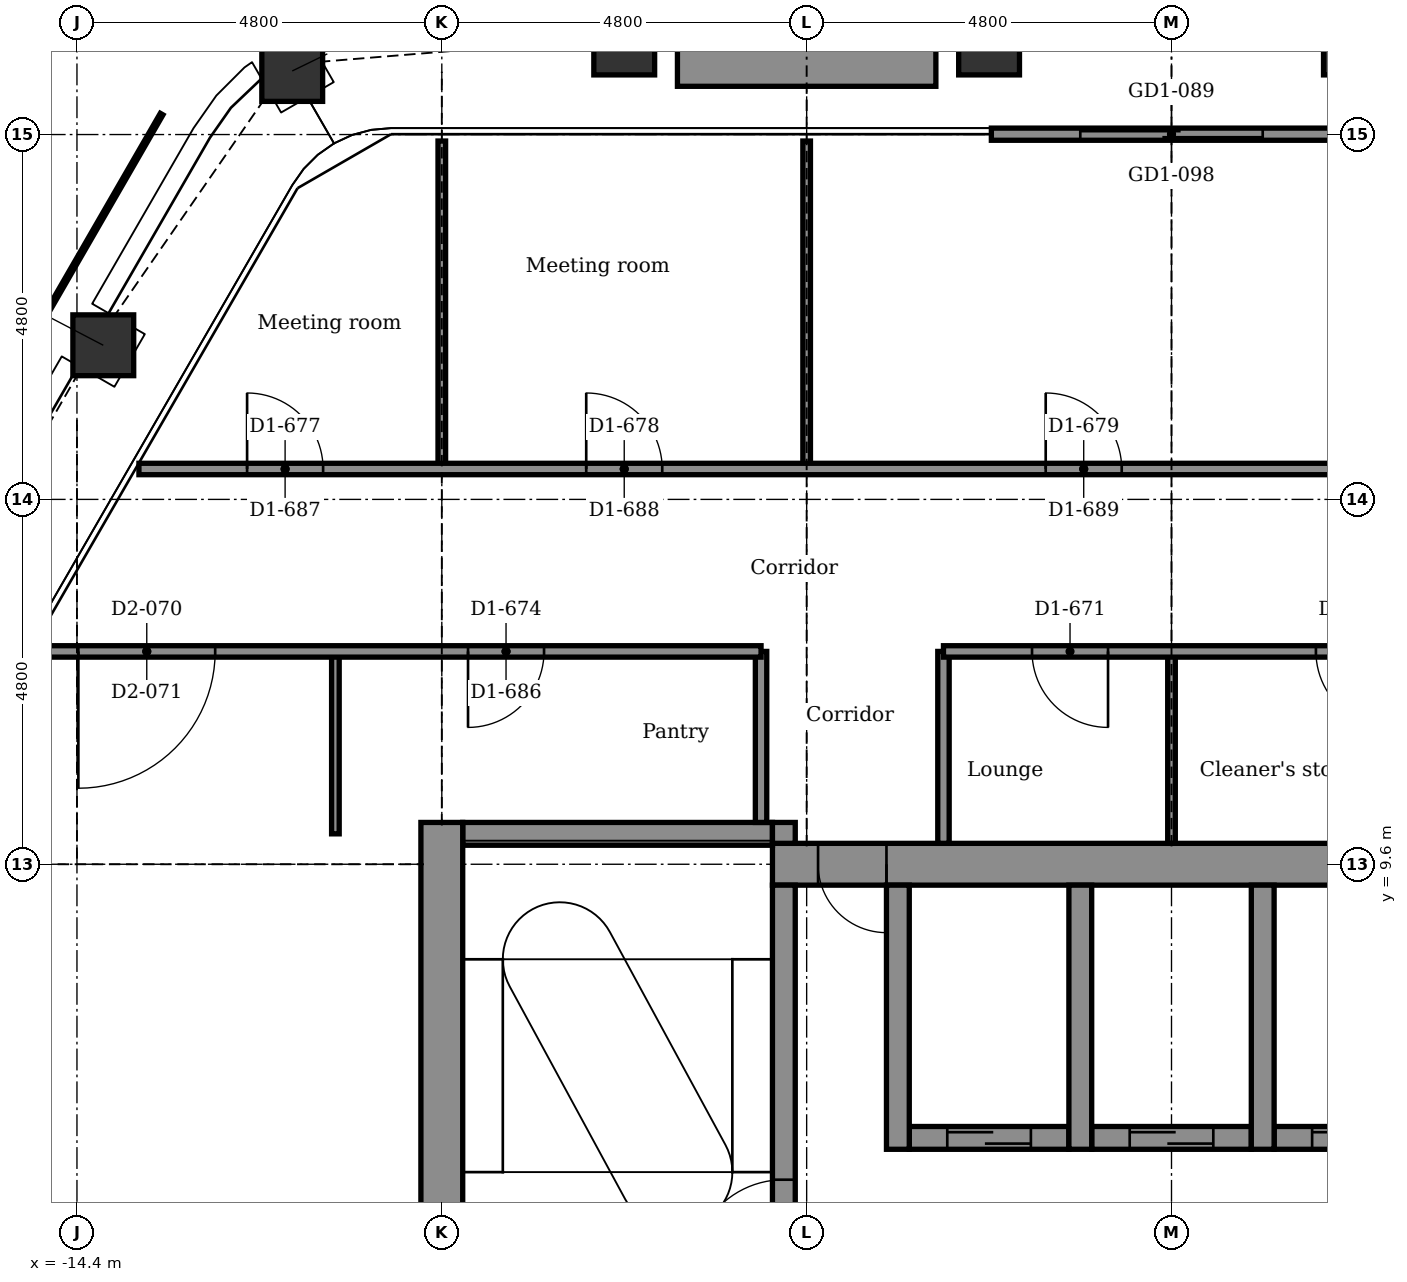
"""IFC4 building model, lengths in metres.
Left out: names, types, materials, properties, quantities, classifications, styles, units other than length and angle.
Written with IfcOpenShell. Run it as: python <this file> out.ifc"""

import sys

from ifc_helpers import new_model, si_unit, direction, frame, frame_2d, origin, origin_2d, place, context, subcontext, project, spatial, rectangle, extrude, element, fill, save


model = new_model("IFC4")
c1 = context("Model", 3, precision=1e-05, world=origin(), true_north=direction((0.0, 1.0)))
c2 = subcontext(c1, "Body", "Model", "MODEL_VIEW")
j1 = project(units=[si_unit("LENGTHUNIT", "METRE"), si_unit("PLANEANGLEUNIT", "RADIAN")], contexts=[c1])
p1 = place(None, origin())
s1 = spatial("IfcSite", under=j1, at=p1, CompositionType="ELEMENT")
p2 = place(p1, origin())
s2 = spatial("IfcBuilding", under=s1, at=p2, CompositionType="ELEMENT")
p3 = place(p2, frame((0.0, 0.0, 242.3)))
s3 = spatial("IfcBuildingStorey", under=s2, at=p3, CompositionType="ELEMENT", Elevation=242.3)
for number, where, z_axis, x_axis in (
    (1, (-11.568, 20.036, -0.15), (0.0, 0.0, 1.0), (0.866, 0.5, 0.0)),
    (2, (-7.2, 20.385, -0.15), (0.0, 0.0, 1.0), (1.0, 0.0, 0.0)),
    (3, (-2.4, 20.385, -0.15), (0.0, 0.0, 1.0), (1.0, 0.0, 0.0)),
    (4, (2.4, 20.385, -0.15), (0.0, 0.0, 1.0), (1.0, 0.0, 0.0)),
    (5, (-14.054, 16.428, -0.15), (0.0, 0.0, 1.0), (0.5, 0.866, 0.0)),
):
    element("IfcColumn", number, at=place(p3, frame(where, z_axis=z_axis, x_axis=x_axis)), inside=s3, PredefinedType="COLUMN", context=c2, shape_type="SweptSolid", body=[
        extrude(rectangle(XDim=0.8, YDim=0.8, at=origin_2d()), origin(), (0.0, 0.0, 1.0), 3.9),
    ])
p4 = place(p3, frame((-3.45, 6.0, -0.15), z_axis=(0.0, 0.0, 1.0), x_axis=(1.0, 0.0, 0.0)))
e6 = element("IfcWall", 6, at=p4, inside=s3, PredefinedType="STANDARD", context=c2, shape_type="SweptSolid", body=[
    extrude(rectangle(XDim=2.1, YDim=0.3, at=frame_2d((1.05, 0.0))), origin(), (0.0, 0.0, 1.0), 3.9),
])
p5 = place(p4, frame((0.5, 0.0, 0.15)))
e7 = element("IfcOpeningElement", 7, at=p5, cuts=e6, PredefinedType="OPENING", context=c2, shape_type="SweptSolid", body=[
    extrude(rectangle(XDim=1.1, YDim=2.1, at=frame_2d((0.55, 1.05))), frame((0.0, 0.16, 0.0), z_axis=(0.0, -1.0, 0.0), x_axis=(1.0, 0.0, 0.0)), (0.0, 0.0, 1.0), 0.32),
])
p6 = place(p3, frame((-1.05, 6.0, -0.15), z_axis=(0.0, 0.0, 1.0), x_axis=(1.0, 0.0, 0.0)))
e8 = element("IfcWall", 8, at=p6, inside=s3, PredefinedType="STANDARD", context=c2, shape_type="SweptSolid", body=[
    extrude(rectangle(XDim=2.1, YDim=0.3, at=frame_2d((1.05, 0.0))), origin(), (0.0, 0.0, 1.0), 3.9),
])
p7 = place(p6, frame((0.5, 0.0, 0.15)))
e9 = element("IfcOpeningElement", 9, at=p7, cuts=e8, PredefinedType="OPENING", context=c2, shape_type="SweptSolid", body=[
    extrude(rectangle(XDim=1.1, YDim=2.1, at=frame_2d((0.55, 1.05))), frame((0.0, 0.16, 0.0), z_axis=(0.0, -1.0, 0.0), x_axis=(1.0, 0.0, 0.0)), (0.0, 0.0, 1.0), 0.32),
])
p8 = place(p3, frame((1.35, 6.0, -0.15), z_axis=(0.0, 0.0, 1.0), x_axis=(1.0, 0.0, 0.0)))
e10 = element("IfcWall", 10, at=p8, inside=s3, PredefinedType="STANDARD", context=c2, shape_type="SweptSolid", body=[
    extrude(rectangle(XDim=2.1, YDim=0.3, at=frame_2d((1.05, 0.0))), origin(), (0.0, 0.0, 1.0), 3.9),
])
p9 = place(p8, frame((0.5, 0.0, 0.15)))
e11 = element("IfcOpeningElement", 11, at=p9, cuts=e10, PredefinedType="OPENING", context=c2, shape_type="SweptSolid", body=[
    extrude(rectangle(XDim=1.1, YDim=2.1, at=frame_2d((0.55, 1.05))), frame((0.0, 0.16, 0.0), z_axis=(0.0, -1.0, 0.0), x_axis=(1.0, 0.0, 0.0)), (0.0, 0.0, 1.0), 0.32),
])
p10 = place(p3, frame((-5.25, 9.6, -0.15), z_axis=(0.0, 0.0, 1.0), x_axis=(1.0, 0.0, 0.0)))
e12 = element("IfcWall", 12, at=p10, inside=s3, PredefinedType="SHEAR", context=c2, shape_type="SweptSolid", body=[
    extrude(rectangle(XDim=14.575, YDim=0.55, at=frame_2d((7.288, 0.0))), origin(), (0.0, 0.0, 1.0), 3.9),
])
p11 = place(p10, frame((0.6, 0.0, 0.15)))
e13 = element("IfcOpeningElement", 13, at=p11, cuts=e12, PredefinedType="OPENING", context=c2, shape_type="SweptSolid", body=[
    extrude(rectangle(XDim=0.9, YDim=2.1, at=frame_2d((0.45, 1.05))), frame((0.0, 0.285, 0.0), z_axis=(0.0, -1.0, 0.0), x_axis=(1.0, 0.0, 0.0)), (0.0, 0.0, 1.0), 0.57),
])
p12 = place(p3, frame((-9.325, 10.0, -0.15), z_axis=(0.0, 0.0, 1.0), x_axis=(1.0, 0.0, 0.0)))
e14 = element("IfcWall", 14, at=p12, inside=s3, PredefinedType="STANDARD", context=c2, shape_type="SweptSolid", body=[
    extrude(rectangle(XDim=4.075, YDim=0.3, at=frame_2d((2.038, 0.0))), origin(), (0.0, 0.0, 1.0), 3.9),
])
p13 = place(p3, frame((-9.6, 2.55, -0.15), z_axis=(0.0, 0.0, 1.0), x_axis=(0.0, 1.0, 0.0)))
e15 = element("IfcWall", 15, at=p13, inside=s3, PredefinedType="SHEAR", context=c2, shape_type="SweptSolid", body=[
    extrude(rectangle(XDim=7.6, YDim=0.55, at=frame_2d((3.8, 0.0))), origin(), (0.0, 0.0, 1.0), 3.9),
])
p14 = place(p3, frame((-5.1, 2.25, -0.15), z_axis=(0.0, 0.0, 1.0), x_axis=(0.0, 1.0, 0.0)))
e16 = element("IfcWall", 16, at=p14, inside=s3, PredefinedType="STANDARD", context=c2, shape_type="SweptSolid", body=[
    extrude(rectangle(XDim=7.075, YDim=0.3, at=frame_2d((3.538, 0.0))), origin(), (0.0, 0.0, 1.0), 3.9),
])
p15 = place(p14, frame((2.0, 0.0, 0.15)))
e17 = element("IfcOpeningElement", 17, at=p15, cuts=e16, PredefinedType="OPENING", context=c2, shape_type="SweptSolid", body=[
    extrude(rectangle(XDim=1.2, YDim=2.1, at=frame_2d((0.6, 1.05))), frame((0.0, 0.16, 0.0), z_axis=(0.0, -1.0, 0.0), x_axis=(1.0, 0.0, 0.0)), (0.0, 0.0, 1.0), 0.32),
])
p16 = place(p3, frame((-5.1, 9.875, -0.15), z_axis=(0.0, 0.0, 1.0), x_axis=(0.0, 1.0, 0.0)))
e18 = element("IfcWall", 18, at=p16, inside=s3, PredefinedType="STANDARD", context=c2, shape_type="SweptSolid", body=[
    extrude(rectangle(XDim=0.275, YDim=0.3, at=frame_2d((0.137, 0.0))), origin(), (0.0, 0.0, 1.0), 3.9),
])
for number, where, z_axis, x_axis in (
    (19, (-3.6, 5.85, -0.15), (0.0, 0.0, 1.0), (0.0, 1.0, 0.0)),
    (20, (-1.2, 5.85, -0.15), (0.0, 0.0, 1.0), (0.0, 1.0, 0.0)),
    (21, (1.2, 5.85, -0.15), (0.0, 0.0, 1.0), (0.0, 1.0, 0.0)),
):
    element("IfcWall", number, at=place(p3, frame(where, z_axis=z_axis, x_axis=x_axis)), inside=s3, PredefinedType="STANDARD", context=c2, shape_type="SweptSolid", body=[
        extrude(rectangle(XDim=3.475, YDim=0.3, at=frame_2d((1.737, 0.0))), origin(), (0.0, 0.0, 1.0), 3.9),
    ])
p17 = place(p3, frame((-2.37, 19.205, 0.0), z_axis=(0.0, 0.0, 1.0), x_axis=(1.0, 0.0, 0.0)))
e22 = element("IfcWall", 22, at=p17, inside=s3, PredefinedType="PARTITIONING", context=c2, shape_type="SweptSolid", body=[
    extrude(rectangle(XDim=4.74, YDim=0.16, at=frame_2d((2.37, 0.0))), origin(), (0.0, 0.0, 1.0), 3.75),
])
p18 = place(p17, frame((1.17, 0.0, 0.0)))
e23 = element("IfcOpeningElement", 23, at=p18, cuts=e22, PredefinedType="OPENING", context=c2, shape_type="SweptSolid", body=[
    extrude(rectangle(XDim=2.4, YDim=2.4, at=frame_2d((1.2, 1.2))), frame((0.0, 0.09, 0.0), z_axis=(0.0, -1.0, 0.0), x_axis=(1.0, 0.0, 0.0)), (0.0, 0.0, 1.0), 0.18),
])
p19 = place(p3, frame((-6.5, 20.135, 0.0), z_axis=(0.0, 0.0, 1.0), x_axis=(1.0, 0.0, 0.0)))
e24 = element("IfcWall", 24, at=p19, inside=s3, PredefinedType="USERDEFINED", context=c2, shape_type="SweptSolid", body=[
    extrude(rectangle(XDim=3.4, YDim=0.6, at=frame_2d((1.7, 0.0))), origin(), (0.0, 0.0, 1.0), 0.7),
])
p20 = place(p3, frame((0.0, 9.875, 0.0), z_axis=(0.0, 0.0, 1.0), x_axis=(0.0, 1.0, 0.0)))
e25 = element("IfcWall", 25, at=p20, inside=s3, PredefinedType="PARTITIONING", context=c2, shape_type="SweptSolid", body=[
    extrude(rectangle(XDim=2.525, YDim=0.1, at=frame_2d((1.262, 0.0))), origin(), (0.0, 0.0, 1.0), 3.217),
])
p21 = place(p3, frame((-3.0, 9.875, 0.0), z_axis=(0.0, 0.0, 1.0), x_axis=(0.0, 1.0, 0.0)))
e26 = element("IfcWall", 26, at=p21, inside=s3, PredefinedType="PARTITIONING", context=c2, shape_type="SweptSolid", body=[
    extrude(rectangle(XDim=2.525, YDim=0.15, at=frame_2d((1.262, 0.0))), origin(), (0.0, 0.0, 1.0), 3.75),
])
p22 = place(p3, frame((-4.8, 14.8, 0.0), z_axis=(0.0, 0.0, 1.0), x_axis=(0.0, 1.0, 0.0)))
e27 = element("IfcWall", 27, at=p22, inside=s3, PredefinedType="PARTITIONING", context=c2, shape_type="SweptSolid", body=[
    extrude(rectangle(XDim=4.314, YDim=0.1, at=frame_2d((2.157, 0.0))), origin(), (0.0, 0.0, 1.0), 3.217),
])
p23 = place(p3, frame((-5.4, 10.15, 0.0), z_axis=(0.0, 0.0, 1.0), x_axis=(0.0, 1.0, 0.0)))
e28 = element("IfcWall", 28, at=p23, inside=s3, PredefinedType="PARTITIONING", context=c2, shape_type="SweptSolid", body=[
    extrude(rectangle(XDim=2.25, YDim=0.15, at=frame_2d((1.125, 0.0))), origin(), (0.0, 0.0, 1.0), 3.75),
])
p24 = place(p3, frame((-9.6, 14.8, 0.0), z_axis=(0.0, 0.0, 1.0), x_axis=(0.0, 1.0, 0.0)))
e29 = element("IfcWall", 29, at=p24, inside=s3, PredefinedType="PARTITIONING", context=c2, shape_type="SweptSolid", body=[
    extrude(rectangle(XDim=4.314, YDim=0.1, at=frame_2d((2.157, 0.0))), origin(), (0.0, 0.0, 1.0), 3.293),
])
p25 = place(p3, frame((-11.0, 10.0, 0.0), z_axis=(0.0, 0.0, 1.0), x_axis=(0.0, 1.0, 0.0)))
e30 = element("IfcWall", 30, at=p25, inside=s3, PredefinedType="PARTITIONING", context=c2, shape_type="SweptSolid", body=[
    extrude(rectangle(XDim=2.4, YDim=0.1, at=frame_2d((1.2, 0.0))), origin(), (0.0, 0.0, 1.0), 3.75),
])
p26 = place(p3, frame((-14.97, 12.4, 0.0), z_axis=(0.0, 0.0, 1.0), x_axis=(1.0, 0.0, 0.0)))
e31 = element("IfcWall", 31, at=p26, inside=s3, PredefinedType="PARTITIONING", context=c2, shape_type="SweptSolid", body=[
    extrude(rectangle(XDim=9.57, YDim=0.15, at=frame_2d((4.785, 0.0))), origin(), (0.0, 0.0, 1.0), 3.75),
])
p27 = place(p26, frame((5.715, 0.0, 0.0)))
e32 = element("IfcOpeningElement", 32, at=p27, cuts=e31, PredefinedType="OPENING", context=c2, shape_type="SweptSolid", body=[
    extrude(rectangle(XDim=1.0, YDim=2.1, at=frame_2d((0.5, 1.05))), frame((0.0, 0.085, 0.0), z_axis=(0.0, -1.0, 0.0), x_axis=(1.0, 0.0, 0.0)), (0.0, 0.0, 1.0), 0.17),
])
p28 = place(p26, frame((0.589, 0.0, 0.0)))
e33 = element("IfcOpeningElement", 33, at=p28, cuts=e31, PredefinedType="OPENING", context=c2, shape_type="SweptSolid", body=[
    extrude(rectangle(XDim=1.8, YDim=2.1, at=frame_2d((0.9, 1.05))), frame((0.0, 0.085, 0.0), z_axis=(0.0, -1.0, 0.0), x_axis=(1.0, 0.0, 0.0)), (0.0, 0.0, 1.0), 0.17),
])
p29 = place(p3, frame((-3.0, 12.4, 0.0), z_axis=(0.0, 0.0, 1.0), x_axis=(1.0, 0.0, 0.0)))
e34 = element("IfcWall", 34, at=p29, inside=s3, PredefinedType="PARTITIONING", context=c2, shape_type="SweptSolid", body=[
    extrude(rectangle(XDim=17.97, YDim=0.15, at=frame_2d((8.985, 0.0))), origin(), (0.0, 0.0, 1.0), 3.75),
])
p30 = place(p29, frame((1.165, 0.0, 0.0)))
e35 = element("IfcOpeningElement", 35, at=p30, cuts=e34, PredefinedType="OPENING", context=c2, shape_type="SweptSolid", body=[
    extrude(rectangle(XDim=1.0, YDim=2.1, at=frame_2d((0.5, 1.05))), frame((0.0, 0.085, 0.0), z_axis=(0.0, -1.0, 0.0), x_axis=(1.0, 0.0, 0.0)), (0.0, 0.0, 1.0), 0.17),
])
p31 = place(p29, frame((4.9, 0.0, 0.0)))
e36 = element("IfcOpeningElement", 36, at=p31, cuts=e34, PredefinedType="OPENING", context=c2, shape_type="SweptSolid", body=[
    extrude(rectangle(XDim=1.0, YDim=2.1, at=frame_2d((0.5, 1.05))), frame((0.0, 0.085, 0.0), z_axis=(0.0, -1.0, 0.0), x_axis=(1.0, 0.0, 0.0)), (0.0, 0.0, 1.0), 0.17),
])
p32 = place(p29, frame((9.7, 0.0, 0.0)))
e37 = element("IfcOpeningElement", 37, at=p32, cuts=e34, PredefinedType="OPENING", context=c2, shape_type="SweptSolid", body=[
    extrude(rectangle(XDim=1.0, YDim=2.1, at=frame_2d((0.5, 1.05))), frame((0.0, 0.085, 0.0), z_axis=(0.0, -1.0, 0.0), x_axis=(1.0, 0.0, 0.0)), (0.0, 0.0, 1.0), 0.17),
])
p33 = place(p29, frame((15.232, 0.0, 0.0)))
e38 = element("IfcOpeningElement", 38, at=p33, cuts=e34, PredefinedType="OPENING", context=c2, shape_type="SweptSolid", body=[
    extrude(rectangle(XDim=1.8, YDim=2.1, at=frame_2d((0.9, 1.05))), frame((0.0, 0.085, 0.0), z_axis=(0.0, -1.0, 0.0), x_axis=(1.0, 0.0, 0.0)), (0.0, 0.0, 1.0), 0.17),
])
p34 = place(p3, frame((-13.585, 14.8, 0.0), z_axis=(0.0, 0.0, 1.0), x_axis=(1.0, 0.0, 0.0)))
e39 = element("IfcWall", 39, at=p34, inside=s3, PredefinedType="PARTITIONING", context=c2, shape_type="SweptSolid", body=[
    extrude(rectangle(XDim=27.169, YDim=0.15, at=frame_2d((13.585, 0.0))), origin(), (0.0, 0.0, 1.0), 3.75),
])
p35 = place(p34, frame((1.423, 0.0, 0.0)))
e40 = element("IfcOpeningElement", 40, at=p35, cuts=e39, PredefinedType="OPENING", context=c2, shape_type="SweptSolid", body=[
    extrude(rectangle(XDim=1.0, YDim=2.1, at=frame_2d((0.5, 1.05))), frame((0.0, 0.085, 0.0), z_axis=(0.0, -1.0, 0.0), x_axis=(1.0, 0.0, 0.0)), (0.0, 0.0, 1.0), 0.17),
])
p36 = place(p34, frame((5.885, 0.0, 0.0)))
e41 = element("IfcOpeningElement", 41, at=p36, cuts=e39, PredefinedType="OPENING", context=c2, shape_type="SweptSolid", body=[
    extrude(rectangle(XDim=1.0, YDim=2.1, at=frame_2d((0.5, 1.05))), frame((0.0, 0.085, 0.0), z_axis=(0.0, -1.0, 0.0), x_axis=(1.0, 0.0, 0.0)), (0.0, 0.0, 1.0), 0.17),
])
p37 = place(p34, frame((11.93, 0.0, 0.0)))
e42 = element("IfcOpeningElement", 42, at=p37, cuts=e39, PredefinedType="OPENING", context=c2, shape_type="SweptSolid", body=[
    extrude(rectangle(XDim=1.0, YDim=2.1, at=frame_2d((0.5, 1.05))), frame((0.0, 0.085, 0.0), z_axis=(0.0, -1.0, 0.0), x_axis=(1.0, 0.0, 0.0)), (0.0, 0.0, 1.0), 0.17),
])
p38 = place(p34, frame((19.85, 0.0, 0.0)))
e43 = element("IfcOpeningElement", 43, at=p38, cuts=e39, PredefinedType="OPENING", context=c2, shape_type="SweptSolid", body=[
    extrude(rectangle(XDim=1.0, YDim=2.1, at=frame_2d((0.5, 1.05))), frame((0.0, 0.085, 0.0), z_axis=(0.0, -1.0, 0.0), x_axis=(1.0, 0.0, 0.0)), (0.0, 0.0, 1.0), 0.17),
])
p39 = place(p34, frame((24.368, 0.0, 0.0)))
e44 = element("IfcOpeningElement", 44, at=p39, cuts=e39, PredefinedType="OPENING", context=c2, shape_type="SweptSolid", body=[
    extrude(rectangle(XDim=1.0, YDim=2.1, at=frame_2d((0.5, 1.05))), frame((0.0, 0.085, 0.0), z_axis=(0.0, -1.0, 0.0), x_axis=(1.0, 0.0, 0.0)), (0.0, 0.0, 1.0), 0.17),
])
p40 = place(p18, origin())
e45 = element("IfcDoor", 45, at=p40, inside=s3, OperationType="DOUBLE_DOOR_SLIDING", PredefinedType="DOOR", context=c2, shape_type="SweptSolid", body=[
    extrude(rectangle(XDim=2.4, YDim=2.4, at=frame_2d((1.2, 1.2))), frame((0.0, 0.025, 0.0), z_axis=(0.0, -1.0, 0.0), x_axis=(1.0, 0.0, 0.0)), (0.0, 0.0, 1.0), 0.05),
])
fill(e23, e45)
p41 = place(p30, frame((1.0, 0.0, 0.0), z_axis=(0.0, 0.0, 1.0), x_axis=(-1.0, 0.0, 0.0)))
e46 = element("IfcDoor", 46, at=p41, inside=s3, OperationType="SINGLE_SWING_RIGHT", PredefinedType="DOOR", context=c2, shape_type="SweptSolid", body=[
    extrude(rectangle(XDim=1.0, YDim=2.1, at=frame_2d((0.5, 1.05))), frame((0.0, 0.025, 0.0), z_axis=(0.0, -1.0, 0.0), x_axis=(1.0, 0.0, 0.0)), (0.0, 0.0, 1.0), 0.05),
])
fill(e35, e46)
p42 = place(p31, frame((1.0, 0.0, 0.0), z_axis=(0.0, 0.0, 1.0), x_axis=(-1.0, 0.0, 0.0)))
e47 = element("IfcDoor", 47, at=p42, inside=s3, OperationType="SINGLE_SWING_RIGHT", PredefinedType="DOOR", context=c2, shape_type="SweptSolid", body=[
    extrude(rectangle(XDim=1.0, YDim=2.1, at=frame_2d((0.5, 1.05))), frame((0.0, 0.025, 0.0), z_axis=(0.0, -1.0, 0.0), x_axis=(1.0, 0.0, 0.0)), (0.0, 0.0, 1.0), 0.05),
])
fill(e36, e47)
p43 = place(p27, frame((1.0, 0.0, 0.0), z_axis=(0.0, 0.0, 1.0), x_axis=(-1.0, 0.0, 0.0)))
e48 = element("IfcDoor", 48, at=p43, inside=s3, OperationType="SINGLE_SWING_LEFT", PredefinedType="DOOR", context=c2, shape_type="SweptSolid", body=[
    extrude(rectangle(XDim=1.0, YDim=2.1, at=frame_2d((0.5, 1.05))), frame((0.0, 0.025, 0.0), z_axis=(0.0, -1.0, 0.0), x_axis=(1.0, 0.0, 0.0)), (0.0, 0.0, 1.0), 0.05),
])
fill(e32, e48)
p44 = place(p35, origin())
e49 = element("IfcDoor", 49, at=p44, inside=s3, OperationType="SINGLE_SWING_LEFT", PredefinedType="DOOR", context=c2, shape_type="SweptSolid", body=[
    extrude(rectangle(XDim=1.0, YDim=2.1, at=frame_2d((0.5, 1.05))), frame((0.0, 0.025, 0.0), z_axis=(0.0, -1.0, 0.0), x_axis=(1.0, 0.0, 0.0)), (0.0, 0.0, 1.0), 0.05),
])
fill(e40, e49)
p45 = place(p36, origin())
e50 = element("IfcDoor", 50, at=p45, inside=s3, OperationType="SINGLE_SWING_LEFT", PredefinedType="DOOR", context=c2, shape_type="SweptSolid", body=[
    extrude(rectangle(XDim=1.0, YDim=2.1, at=frame_2d((0.5, 1.05))), frame((0.0, 0.025, 0.0), z_axis=(0.0, -1.0, 0.0), x_axis=(1.0, 0.0, 0.0)), (0.0, 0.0, 1.0), 0.05),
])
fill(e41, e50)
p46 = place(p37, origin())
e51 = element("IfcDoor", 51, at=p46, inside=s3, OperationType="SINGLE_SWING_LEFT", PredefinedType="DOOR", context=c2, shape_type="SweptSolid", body=[
    extrude(rectangle(XDim=1.0, YDim=2.1, at=frame_2d((0.5, 1.05))), frame((0.0, 0.025, 0.0), z_axis=(0.0, -1.0, 0.0), x_axis=(1.0, 0.0, 0.0)), (0.0, 0.0, 1.0), 0.05),
])
fill(e42, e51)
p47 = place(p28, frame((1.8, 0.0, 0.0), z_axis=(0.0, 0.0, 1.0), x_axis=(-1.0, 0.0, 0.0)))
e52 = element("IfcDoor", 52, at=p47, inside=s3, OperationType="SINGLE_SWING_LEFT", PredefinedType="DOOR", context=c2, shape_type="SweptSolid", body=[
    extrude(rectangle(XDim=1.8, YDim=2.1, at=frame_2d((0.9, 1.05))), frame((0.0, 0.025, 0.0), z_axis=(0.0, -1.0, 0.0), x_axis=(1.0, 0.0, 0.0)), (0.0, 0.0, 1.0), 0.05),
])
fill(e33, e52)
p48 = place(p5, origin())
e53 = element("IfcDoor", 53, at=p48, inside=s3, OperationType="DOUBLE_DOOR_SLIDING", PredefinedType="DOOR", context=c2, shape_type="SweptSolid", body=[
    extrude(rectangle(XDim=1.1, YDim=2.1, at=frame_2d((0.55, 1.05))), frame((0.0, 0.025, 0.0), z_axis=(0.0, -1.0, 0.0), x_axis=(1.0, 0.0, 0.0)), (0.0, 0.0, 1.0), 0.05),
])
fill(e7, e53)
p49 = place(p7, origin())
e54 = element("IfcDoor", 54, at=p49, inside=s3, OperationType="DOUBLE_DOOR_SLIDING", PredefinedType="DOOR", context=c2, shape_type="SweptSolid", body=[
    extrude(rectangle(XDim=1.1, YDim=2.1, at=frame_2d((0.55, 1.05))), frame((0.0, 0.025, 0.0), z_axis=(0.0, -1.0, 0.0), x_axis=(1.0, 0.0, 0.0)), (0.0, 0.0, 1.0), 0.05),
])
fill(e9, e54)
p50 = place(p9, origin())
e55 = element("IfcDoor", 55, at=p50, inside=s3, OperationType="DOUBLE_DOOR_SLIDING", PredefinedType="DOOR", context=c2, shape_type="SweptSolid", body=[
    extrude(rectangle(XDim=1.1, YDim=2.1, at=frame_2d((0.55, 1.05))), frame((0.0, 0.025, 0.0), z_axis=(0.0, -1.0, 0.0), x_axis=(1.0, 0.0, 0.0)), (0.0, 0.0, 1.0), 0.05),
])
fill(e11, e55)
p51 = place(p15, origin())
e56 = element("IfcDoor", 56, at=p51, inside=s3, OperationType="SINGLE_SWING_LEFT", PredefinedType="DOOR", context=c2, shape_type="SweptSolid", body=[
    extrude(rectangle(XDim=1.2, YDim=2.1, at=frame_2d((0.6, 1.05))), frame((0.0, 0.025, 0.0), z_axis=(0.0, -1.0, 0.0), x_axis=(1.0, 0.0, 0.0)), (0.0, 0.0, 1.0), 0.05),
])
fill(e17, e56)
p52 = place(p11, frame((0.9, 0.0, 0.0), z_axis=(0.0, 0.0, 1.0), x_axis=(-1.0, 0.0, 0.0)))
e57 = element("IfcDoor", 57, at=p52, inside=s3, OperationType="SINGLE_SWING_RIGHT", PredefinedType="DOOR", context=c2, shape_type="SweptSolid", body=[
    extrude(rectangle(XDim=0.9, YDim=2.1, at=frame_2d((0.45, 1.05))), frame((0.0, 0.025, 0.0), z_axis=(0.0, -1.0, 0.0), x_axis=(1.0, 0.0, 0.0)), (0.0, 0.0, 1.0), 0.05),
])
fill(e13, e57)
save(model, sys.argv[1])
